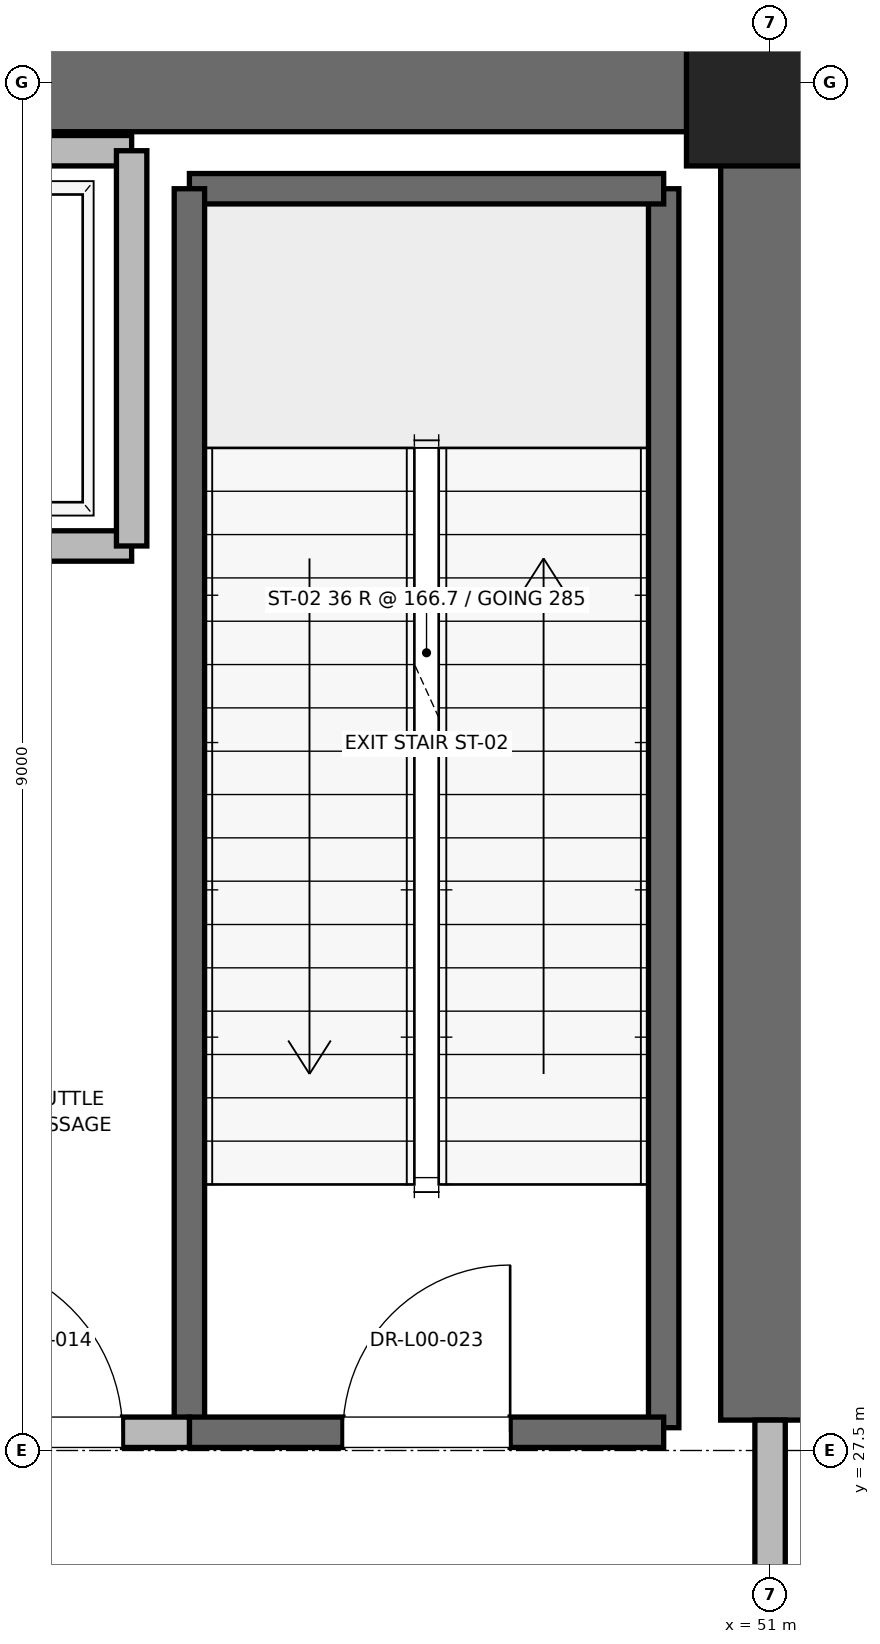
"""IFC4 building model, lengths in metres.
Left out: names, types, materials, properties, quantities, classifications, styles, units other than length and angle.
Written with IfcOpenShell. Run it as: python <this file> out.ifc"""

import sys

from ifc_helpers import new_model, si_unit, direction, frame, frame_2d, origin, origin_2d, place, context, subcontext, project, spatial, rectangle, extrude, element, fill, save


model = new_model("IFC4")
c1 = context("Model", 3, precision=1e-05, world=origin(), true_north=direction((0.0, 1.0)))
c2 = subcontext(c1, "Body", "Model", "MODEL_VIEW")
j1 = project(units=[si_unit("LENGTHUNIT", "METRE"), si_unit("PLANEANGLEUNIT", "RADIAN")], contexts=[c1])
p1 = place(None, origin())
s1 = spatial("IfcSite", under=j1, at=p1, CompositionType="ELEMENT")
p2 = place(p1, origin())
s2 = spatial("IfcBuilding", under=s1, at=p2, CompositionType="ELEMENT")
p3 = place(p2, origin())
s3 = spatial("IfcBuildingStorey", under=s2, at=p3, CompositionType="ELEMENT", Elevation=0.0)
p4 = place(p3, frame((51.0, 36.5, 0.0), z_axis=(0.0, 0.0, 1.0), x_axis=(1.0, 0.0, 0.0)))
e1 = element("IfcColumn", 1, at=p4, inside=s3, PredefinedType="PILASTER", context=c2, shape_type="SweptSolid", body=[
    extrude(rectangle(XDim=1.1, YDim=1.1, at=origin_2d()), origin(), (0.0, 0.0, 1.0), 6.0),
])
p5 = place(p3, frame((45.2, 36.5, 0.0), z_axis=(0.0, 0.0, 1.0), x_axis=(1.0, 0.0, 0.0)))
e2 = element("IfcWall", 2, at=p5, inside=s3, PredefinedType="SHEAR", context=c2, shape_type="SweptSolid", body=[
    extrude(rectangle(XDim=5.8, YDim=0.65, at=frame_2d((2.9, 0.0))), origin(), (0.0, 0.0, 1.0), 5.72),
])
p6 = place(p3, frame((51.0, 27.7, 0.0), z_axis=(0.0, 0.0, 1.0), x_axis=(0.0, 1.0, 0.0)))
e3 = element("IfcWall", 3, at=p6, inside=s3, PredefinedType="SHEAR", context=c2, shape_type="SweptSolid", body=[
    extrude(rectangle(XDim=8.8, YDim=0.65, at=frame_2d((4.4, 0.0))), origin(), (0.0, 0.0, 1.0), 5.72),
])
p7 = place(p3, frame((50.3, 27.65, 0.0), z_axis=(0.0, 0.0, 1.0), x_axis=(0.0, 1.0, 0.0)))
e4 = element("IfcWall", 4, at=p7, inside=s3, PredefinedType="SOLIDWALL", context=c2, shape_type="SweptSolid", body=[
    extrude(rectangle(XDim=8.15, YDim=0.2, at=frame_2d((4.075, 0.0))), origin(), (0.0, 0.0, 1.0), 5.72),
])
p8 = place(p3, frame((47.18, 35.8, 0.0), z_axis=(0.0, 0.0, 1.0), x_axis=(1.0, 0.0, 0.0)))
e5 = element("IfcWall", 5, at=p8, inside=s3, PredefinedType="SOLIDWALL", context=c2, shape_type="SweptSolid", body=[
    extrude(rectangle(XDim=3.12, YDim=0.2, at=frame_2d((1.56, 0.0))), origin(), (0.0, 0.0, 1.0), 5.72),
])
p9 = place(p3, frame((47.18, 27.62, 0.0), z_axis=(0.0, 0.0, 1.0), x_axis=(0.0, 1.0, 0.0)))
e6 = element("IfcWall", 6, at=p9, inside=s3, PredefinedType="SOLIDWALL", context=c2, shape_type="SweptSolid", body=[
    extrude(rectangle(XDim=8.18, YDim=0.2, at=frame_2d((4.09, 0.0))), origin(), (0.0, 0.0, 1.0), 5.72),
])
p10 = place(p3, frame((47.18, 27.62, 0.0), z_axis=(0.0, 0.0, 1.0), x_axis=(1.0, 0.0, 0.0)))
e7 = element("IfcWall", 7, at=p10, inside=s3, PredefinedType="SOLIDWALL", context=c2, shape_type="SweptSolid", body=[
    extrude(rectangle(XDim=3.12, YDim=0.2, at=frame_2d((1.56, 0.0))), origin(), (0.0, 0.0, 1.0), 5.72),
])
p11 = place(p10, frame((1.01, 0.0, 0.0)))
e8 = element("IfcOpeningElement", 8, at=p11, cuts=e7, PredefinedType="OPENING", context=c2, shape_type="SweptSolid", body=[
    extrude(rectangle(XDim=1.1, YDim=2.15, at=frame_2d((0.55, 1.075))), frame((0.0, 0.1, 0.0), z_axis=(0.0, -1.0, 0.0), x_axis=(1.0, 0.0, 0.0)), (0.0, 0.0, 1.0), 0.2),
])
p12 = place(p3, frame((45.15, 27.62, 0.0), z_axis=(0.0, 0.0, 1.0), x_axis=(1.0, 0.0, 0.0)))
e9 = element("IfcWall", 9, at=p12, inside=s3, PredefinedType="PARTITIONING", context=c2, shape_type="SweptSolid", body=[
    extrude(rectangle(XDim=2.03, YDim=0.2, at=frame_2d((1.015, 0.0))), origin(), (0.0, 0.0, 1.0), 5.72),
])
p13 = place(p12, frame((0.44, 0.0, 0.0)))
e10 = element("IfcOpeningElement", 10, at=p13, cuts=e9, PredefinedType="OPENING", context=c2, shape_type="SweptSolid", body=[
    extrude(rectangle(XDim=1.15, YDim=2.2, at=frame_2d((0.575, 1.1))), frame((0.0, 0.1, 0.0), z_axis=(0.0, -1.0, 0.0), x_axis=(1.0, 0.0, 0.0)), (0.0, 0.0, 1.0), 0.2),
])
p14 = place(p3, frame((51.0, 27.7, 0.0), z_axis=(0.0, 0.0, 1.0), x_axis=(0.0, -1.0, 0.0)))
e11 = element("IfcWall", 11, at=p14, inside=s3, PredefinedType="PARTITIONING", context=c2, shape_type="SweptSolid", body=[
    extrude(rectangle(XDim=3.4, YDim=0.2, at=frame_2d((1.7, 0.0))), origin(), (0.0, 0.0, 1.0), 4.5),
])
p15 = place(p14, frame((1.125, 0.0, 0.0)))
e12 = element("IfcOpeningElement", 12, at=p15, cuts=e11, PredefinedType="OPENING", context=c2, shape_type="SweptSolid", body=[
    extrude(rectangle(XDim=1.15, YDim=2.2, at=frame_2d((0.575, 1.1))), frame((0.0, 0.1, 0.0), z_axis=(0.0, -1.0, 0.0), x_axis=(1.0, 0.0, 0.0)), (0.0, 0.0, 1.0), 0.2),
])
p16 = place(p3, frame((44.5, 33.45, 0.0), z_axis=(0.0, 0.0, 1.0), x_axis=(1.0, 0.0, 0.0)))
e13 = element("IfcWall", 13, at=p16, inside=s3, PredefinedType="SOLIDWALL", context=c2, shape_type="SweptSolid", body=[
    extrude(rectangle(XDim=2.3, YDim=0.2, at=frame_2d((1.15, 0.0))), origin(), (0.0, 0.0, 1.0), 5.72),
])
p17 = place(p16, frame((0.6, 0.0, 0.0)))
e14 = element("IfcOpeningElement", 14, at=p17, cuts=e13, PredefinedType="OPENING", context=c2, shape_type="SweptSolid", body=[
    extrude(rectangle(XDim=1.1, YDim=2.2, at=frame_2d((0.55, 1.1))), frame((0.0, 0.1, 0.0), z_axis=(0.0, -1.0, 0.0), x_axis=(1.0, 0.0, 0.0)), (0.0, 0.0, 1.0), 0.2),
])
p18 = place(p3, frame((46.8, 36.05, 0.0), z_axis=(0.0, 0.0, 1.0), x_axis=(-1.0, 0.0, 0.0)))
e15 = element("IfcWall", 15, at=p18, inside=s3, PredefinedType="SOLIDWALL", context=c2, shape_type="SweptSolid", body=[
    extrude(rectangle(XDim=2.3, YDim=0.2, at=frame_2d((1.15, 0.0))), origin(), (0.0, 0.0, 1.0), 4.5),
])
p19 = place(p3, frame((46.8, 33.45, 0.0), z_axis=(0.0, 0.0, 1.0), x_axis=(0.0, 1.0, 0.0)))
e16 = element("IfcWall", 16, at=p19, inside=s3, PredefinedType="SOLIDWALL", context=c2, shape_type="SweptSolid", body=[
    extrude(rectangle(XDim=2.6, YDim=0.2, at=frame_2d((1.3, 0.0))), origin(), (0.0, 0.0, 1.0), 5.72),
])
p20 = place(p3, frame((51.18, 39.35, 0.0), z_axis=(0.0, 0.0, 1.0), x_axis=(0.0, -1.0, 0.0)))
e17 = element("IfcWall", 17, at=p20, inside=s3, PredefinedType="PARTITIONING", context=c2, shape_type="SweptSolid", body=[
    extrude(rectangle(XDim=2.75, YDim=0.15, at=frame_2d((1.375, 0.0))), origin(), (0.0, 0.0, 1.0), 2.85),
])
p21 = place(p20, frame((0.8, 0.0, 0.0)))
e18 = element("IfcOpeningElement", 18, at=p21, cuts=e17, PredefinedType="OPENING", context=c2, shape_type="SweptSolid", body=[
    extrude(rectangle(XDim=1.15, YDim=2.2, at=frame_2d((0.575, 1.1))), frame((0.0, 0.075, 0.0), z_axis=(0.0, -1.0, 0.0), x_axis=(1.0, 0.0, 0.0)), (0.0, 0.0, 1.0), 0.15),
])
p22 = place(p11, origin())
e19 = element("IfcDoor", 19, at=p22, inside=s3, OperationType="SINGLE_SWING_RIGHT", PredefinedType="DOOR", context=c2, shape_type="SweptSolid", body=[
    extrude(rectangle(XDim=1.1, YDim=2.15, at=frame_2d((0.55, 1.075))), frame((0.0, 0.025, 0.0), z_axis=(0.0, -1.0, 0.0), x_axis=(1.0, 0.0, 0.0)), (0.0, 0.0, 1.0), 0.05),
])
fill(e8, e19)
p23 = place(p13, origin())
e20 = element("IfcDoor", 20, at=p23, inside=s3, OperationType="SINGLE_SWING_LEFT", PredefinedType="DOOR", context=c2, shape_type="SweptSolid", body=[
    extrude(rectangle(XDim=1.15, YDim=2.2, at=frame_2d((0.575, 1.1))), frame((0.0, 0.025, 0.0), z_axis=(0.0, -1.0, 0.0), x_axis=(1.0, 0.0, 0.0)), (0.0, 0.0, 1.0), 0.05),
])
fill(e10, e20)
save(model, sys.argv[1])
